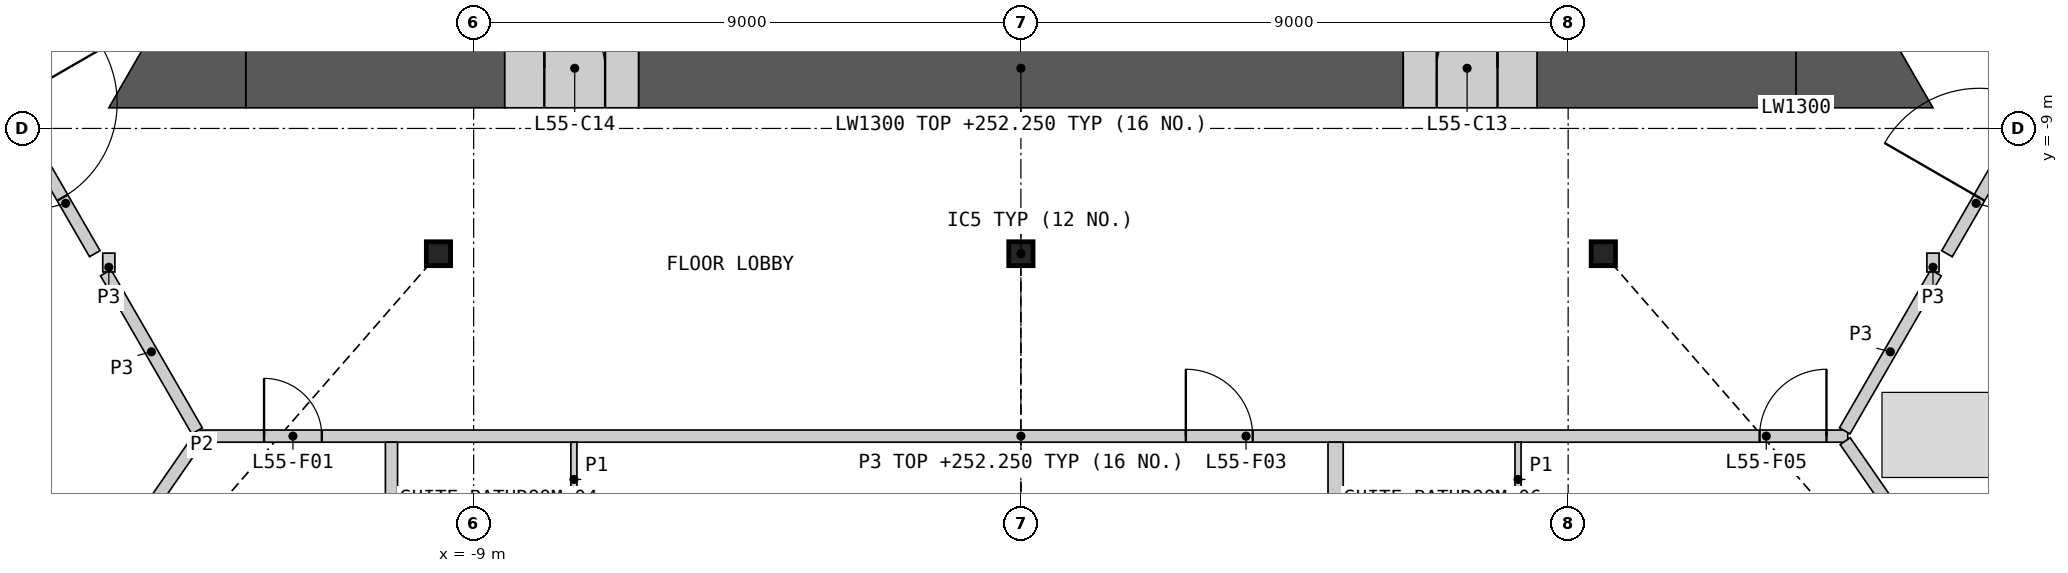
"""IFC4 building model, lengths in metres.
Left out: names, types, materials, properties, quantities, classifications, styles, units other than length and angle.
Written with IfcOpenShell. Run it as: python <this file> out.ifc"""

import sys

from ifc_helpers import new_model, si_unit, direction, frame, frame_2d, origin, origin_2d, place, context, subcontext, project, spatial, polyline, rectangle, i_section, outline, extrude, element, fill, save


model = new_model("IFC4")
c1 = context("Model", 3, precision=1e-05, world=origin(), true_north=direction((0.0, 1.0)))
c2 = subcontext(c1, "Body", "Model", "MODEL_VIEW")
j1 = project(units=[si_unit("LENGTHUNIT", "METRE"), si_unit("PLANEANGLEUNIT", "RADIAN")], contexts=[c1])
p1 = place(None, origin())
s1 = spatial("IfcSite", under=j1, at=p1, CompositionType="ELEMENT")
p2 = place(p1, origin())
s2 = spatial("IfcBuilding", under=s1, at=p2, CompositionType="ELEMENT")
p3 = place(p2, frame((0.0, 0.0, 249.0)))
s3 = spatial("IfcBuildingStorey", under=s2, at=p3, CompositionType="ELEMENT", Elevation=249.0)
for number, where, z_axis, x_axis in (
    (1, (-9.578, -11.06, 0.0), (0.0, 0.0, 1.0), (1.0, 0.0, 0.0)),
    (2, (0.0, -11.06, 0.0), (0.0, 0.0, 1.0), (1.0, 0.0, 0.0)),
    (3, (9.578, -11.06, 0.0), (0.0, 0.0, 1.0), (1.0, 0.0, 0.0)),
):
    element("IfcColumn", number, at=place(p3, frame(where, z_axis=z_axis, x_axis=x_axis)), inside=s3, PredefinedType="COLUMN", context=c2, shape_type="SweptSolid", body=[
        extrude(i_section(OverallWidth=0.399, OverallDepth=0.393, WebThickness=0.023, FlangeThickness=0.037, at=origin_2d()), origin(), (0.0, 0.0, 1.0), 3.6),
    ])
p4 = place(p3, frame((-6.288, -8.01, 0.0), z_axis=(0.0, 0.0, 1.0), x_axis=(1.0, 0.0, 0.0)))
e4 = element("IfcWall", 4, at=p4, inside=s3, PredefinedType="SHEAR", context=c2, shape_type="SweptSolid", body=[
    extrude(rectangle(XDim=12.576, YDim=1.3, at=frame_2d((6.288, 0.0))), origin(), (0.0, 0.0, 1.0), 3.25),
])
for number, where, z_axis, x_axis in (
    (5, (8.488, -8.01, 0.0), (0.0, 0.0, 1.0), (1.0, 0.0, 0.0)),
    (6, (-12.748, -8.01, 0.0), (0.0, 0.0, 1.0), (1.0, 0.0, 0.0)),
):
    element("IfcWall", number, at=place(p3, frame(where, z_axis=z_axis, x_axis=x_axis)), inside=s3, PredefinedType="SHEAR", context=c2, shape_type="SweptSolid", body=[
        extrude(rectangle(XDim=4.26, YDim=1.3, at=frame_2d((2.13, 0.0))), origin(), (0.0, 0.0, 1.0), 3.25),
    ])
p5 = place(p3, origin())
e7 = element("IfcWall", 7, at=p5, inside=s3, PredefinedType="SHEAR", context=c2, shape_type="SweptSolid", body=[
    extrude(outline(polyline([(12.748, -8.66), (12.748, -7.36), (13.874, -6.71), (15.0, -8.66), (12.748, -8.66)])), origin(), (0.0, 0.0, 1.0), 3.25),
])
p6 = place(p3, origin())
e8 = element("IfcWall", 8, at=p6, inside=s3, PredefinedType="SHEAR", context=c2, shape_type="SweptSolid", body=[
    extrude(outline(polyline([(-13.874, -6.71), (-12.748, -7.36), (-12.748, -8.66), (-15.0, -8.66), (-13.874, -6.71)])), origin(), (0.0, 0.0, 1.0), 3.25),
])
p7 = place(p3, frame((6.288, -8.01, 0.0), z_axis=(0.0, 0.0, 1.0), x_axis=(1.0, 0.0, 0.0)))
e9 = element("IfcWall", 9, at=p7, inside=s3, PredefinedType="SHEAR", context=c2, shape_type="SweptSolid", body=[
    extrude(rectangle(XDim=2.2, YDim=1.3, at=frame_2d((1.1, 0.0))), origin(), (0.0, 0.0, 1.0), 3.25),
])
p8 = place(p7, frame((0.55, 0.0, 0.0)))
e10 = element("IfcOpeningElement", 10, at=p8, cuts=e9, PredefinedType="OPENING", context=c2, shape_type="SweptSolid", body=[
    extrude(rectangle(XDim=1.0, YDim=2.1, at=frame_2d((0.5, 1.05))), frame((0.0, 0.66, 0.0), z_axis=(0.0, -1.0, 0.0), x_axis=(1.0, 0.0, 0.0)), (0.0, 0.0, 1.0), 1.32),
])
p9 = place(p3, frame((-8.488, -8.01, 0.0), z_axis=(0.0, 0.0, 1.0), x_axis=(1.0, 0.0, 0.0)))
e11 = element("IfcWall", 11, at=p9, inside=s3, PredefinedType="SHEAR", context=c2, shape_type="SweptSolid", body=[
    extrude(rectangle(XDim=2.2, YDim=1.3, at=frame_2d((1.1, 0.0))), origin(), (0.0, 0.0, 1.0), 3.25),
])
p10 = place(p9, frame((0.65, 0.0, 0.0)))
e12 = element("IfcOpeningElement", 12, at=p10, cuts=e11, PredefinedType="OPENING", context=c2, shape_type="SweptSolid", body=[
    extrude(rectangle(XDim=1.0, YDim=2.1, at=frame_2d((0.5, 1.05))), frame((0.0, 0.66, 0.0), z_axis=(0.0, -1.0, 0.0), x_axis=(1.0, 0.0, 0.0)), (0.0, 0.0, 1.0), 1.32),
])
p11 = place(p3, frame((-13.599, -14.06, 0.0), z_axis=(0.0, 0.0, 1.0), x_axis=(1.0, 0.0, 0.0)))
e13 = element("IfcWall", 13, at=p11, inside=s3, PredefinedType="PARTITIONING", context=c2, shape_type="SweptSolid", body=[
    extrude(rectangle(XDim=27.198, YDim=0.2, at=frame_2d((13.599, 0.0))), origin(), (0.0, 0.0, 1.0), 3.25),
])
p12 = place(p11, frame((1.152, 0.0, 0.0)))
e14 = element("IfcOpeningElement", 14, at=p12, cuts=e13, PredefinedType="OPENING", context=c2, shape_type="SweptSolid", body=[
    extrude(rectangle(XDim=0.95, YDim=2.1, at=frame_2d((0.475, 1.05))), frame((0.0, 0.11, 0.0), z_axis=(0.0, -1.0, 0.0), x_axis=(1.0, 0.0, 0.0)), (0.0, 0.0, 1.0), 0.22),
])
p13 = place(p11, frame((16.311, 0.0, 0.0)))
e15 = element("IfcOpeningElement", 15, at=p13, cuts=e13, PredefinedType="OPENING", context=c2, shape_type="SweptSolid", body=[
    extrude(rectangle(XDim=1.1, YDim=2.1, at=frame_2d((0.55, 1.05))), frame((0.0, 0.11, 0.0), z_axis=(0.0, -1.0, 0.0), x_axis=(1.0, 0.0, 0.0)), (0.0, 0.0, 1.0), 0.22),
])
p14 = place(p11, frame((25.747, 0.0, 0.0)))
e16 = element("IfcOpeningElement", 16, at=p14, cuts=e13, PredefinedType="OPENING", context=c2, shape_type="SweptSolid", body=[
    extrude(rectangle(XDim=1.1, YDim=2.1, at=frame_2d((0.55, 1.05))), frame((0.0, 0.11, 0.0), z_axis=(0.0, -1.0, 0.0), x_axis=(1.0, 0.0, 0.0)), (0.0, 0.0, 1.0), 0.22),
])
p15 = place(p3, frame((-17.244, -7.747, 0.0), z_axis=(0.0, 0.0, 1.0), x_axis=(0.500017753321, 0.866015153657, 0.0)))
e17 = element("IfcWall", 17, at=p15, inside=s3, PredefinedType="PARTITIONING", context=c2, shape_type="SweptSolid", body=[
    extrude(rectangle(XDim=5.51, YDim=0.2, at=frame_2d((2.755, 0.0))), origin(), (0.0, 0.0, 1.0), 3.25),
])
p16 = place(p15, frame((0.401, 0.0, 0.0)))
e18 = element("IfcOpeningElement", 18, at=p16, cuts=e17, PredefinedType="OPENING", context=c2, shape_type="SweptSolid", body=[
    extrude(rectangle(XDim=1.1, YDim=2.1, at=frame_2d((0.55, 1.05))), frame((0.0, 0.11, 0.0), z_axis=(0.0, -1.0, 0.0), x_axis=(1.0, 0.0, 0.0)), (0.0, 0.0, 1.0), 0.22),
])
p17 = place(p3, frame((14.489, -2.975, 0.0), z_axis=(0.0, 0.0, 1.0), x_axis=(0.500017753321, -0.866015153657, 0.0)))
e19 = element("IfcWall", 19, at=p17, inside=s3, PredefinedType="PARTITIONING", context=c2, shape_type="SweptSolid", body=[
    extrude(rectangle(XDim=5.51, YDim=0.2, at=frame_2d((2.755, 0.0))), origin(), (0.0, 0.0, 1.0), 3.25),
])
p18 = place(p17, frame((4.06, 0.0, 0.0)))
e20 = element("IfcOpeningElement", 20, at=p18, cuts=e19, PredefinedType="OPENING", context=c2, shape_type="SweptSolid", body=[
    extrude(rectangle(XDim=1.1, YDim=2.1, at=frame_2d((0.55, 1.05))), frame((0.0, 0.11, 0.0), z_axis=(0.0, -1.0, 0.0), x_axis=(1.0, 0.0, 0.0)), (0.0, 0.0, 1.0), 0.22),
])
p19 = place(p3, frame((5.176, -18.855, 0.0), z_axis=(0.0, 0.0, 1.0), x_axis=(0.0, 1.0, 0.0)))
e21 = element("IfcWall", 21, at=p19, inside=s3, PredefinedType="PARTITIONING", context=c2, shape_type="SweptSolid", body=[
    extrude(rectangle(XDim=4.695, YDim=0.25, at=frame_2d((2.348, 0.0))), origin(), (0.0, 0.0, 1.0), 2.404),
])
p20 = place(p3, frame((15.231, -11.06, 0.0), z_axis=(0.0, 0.0, 1.0), x_axis=(0.499961815444, 0.866047448526, 0.0)))
e22 = element("IfcWall", 22, at=p20, inside=s3, PredefinedType="PARTITIONING", context=c2, shape_type="SweptSolid", body=[
    extrude(rectangle(XDim=3.826, YDim=0.2, at=frame_2d((1.913, 0.0))), origin(), (0.0, 0.0, 1.0), 3.25),
])
p21 = place(p20, frame((1.064, 0.0, 0.0)))
e23 = element("IfcOpeningElement", 23, at=p21, cuts=e22, PredefinedType="OPENING", context=c2, shape_type="SweptSolid", body=[
    extrude(rectangle(XDim=1.8, YDim=2.1, at=frame_2d((0.9, 1.05))), frame((0.0, 0.11, 0.0), z_axis=(0.0, -1.0, 0.0), x_axis=(1.0, 0.0, 0.0)), (0.0, 0.0, 1.0), 0.22),
])
p22 = place(p3, frame((-17.144, -7.747, 0.0), z_axis=(0.0, 0.0, 1.0), x_axis=(0.499961815444, -0.866047448526, 0.0)))
e24 = element("IfcWall", 24, at=p22, inside=s3, PredefinedType="PARTITIONING", context=c2, shape_type="SweptSolid", body=[
    extrude(rectangle(XDim=3.826, YDim=0.2, at=frame_2d((1.913, 0.0))), origin(), (0.0, 0.0, 1.0), 3.25),
])
p23 = place(p22, frame((0.962, 0.0, 0.0)))
e25 = element("IfcOpeningElement", 25, at=p23, cuts=e24, PredefinedType="OPENING", context=c2, shape_type="SweptSolid", body=[
    extrude(rectangle(XDim=1.8, YDim=2.1, at=frame_2d((0.9, 1.05))), frame((0.0, 0.11, 0.0), z_axis=(0.0, -1.0, 0.0), x_axis=(1.0, 0.0, 0.0)), (0.0, 0.0, 1.0), 0.22),
])
for number, where, z_axis, x_axis in (
    (26, (13.549, -13.974, 0.0), (0.0, 0.0, 1.0), (0.5, 0.866, 0.0)),
    (27, (-15.05, -11.374, 0.0), (0.0, 0.0, 1.0), (0.5, -0.866, 0.0)),
):
    element("IfcWall", number, at=place(p3, frame(where, z_axis=z_axis, x_axis=x_axis)), inside=s3, PredefinedType="PARTITIONING", context=c2, shape_type="SweptSolid", body=[
        extrude(rectangle(XDim=3.002, YDim=0.2, at=frame_2d((1.501, 0.0))), origin(), (0.0, 0.0, 1.0), 3.25),
    ])
for number, where, z_axis, x_axis in (
    (28, (15.0, -11.36, 0.0), (0.0, 0.0, 1.0), (0.0, 1.0, 0.0)),
    (29, (-15.0, -11.36, 0.0), (0.0, 0.0, 1.0), (0.0, 1.0, 0.0)),
):
    element("IfcWall", number, at=place(p3, frame(where, z_axis=z_axis, x_axis=x_axis)), inside=s3, PredefinedType="PARTITIONING", context=c2, shape_type="SweptSolid", body=[
        extrude(rectangle(XDim=0.31, YDim=0.2, at=frame_2d((0.155, 0.0))), origin(), (0.0, 0.0, 1.0), 3.25),
    ])
p24 = place(p3, origin())
e30 = element("IfcWall", 30, at=p24, inside=s3, PredefinedType="PARTITIONING", context=c2, shape_type="SweptSolid", body=[
    extrude(outline(polyline([(-13.473, -14.199), (-19.794, -23.331), (-20.439, -23.912), (-13.638, -14.086), (-13.473, -14.199)])), origin(), (0.0, 0.0, 1.0), 2.404),
])
p25 = place(p3, frame((13.556, -14.143, 0.0), z_axis=(0.0, 0.0, 1.0), x_axis=(0.56913494803, -0.82224413098, 0.0)))
e31 = element("IfcWall", 31, at=p25, inside=s3, PredefinedType="PARTITIONING", context=c2, shape_type="SweptSolid", body=[
    extrude(rectangle(XDim=12.014, YDim=0.2, at=frame_2d((6.007, 0.0))), origin(), (0.0, 0.0, 1.0), 2.404),
])
p26 = place(p3, frame((-10.351, -23.527, 0.0), z_axis=(0.0, 0.0, 1.0), x_axis=(0.0, 1.0, 0.0)))
e32 = element("IfcWall", 32, at=p26, inside=s3, PredefinedType="PARTITIONING", context=c2, shape_type="SweptSolid", body=[
    extrude(rectangle(XDim=9.366, YDim=0.2, at=frame_2d((4.683, 0.0))), origin(), (0.0, 0.0, 1.0), 2.404),
])
p27 = place(p3, frame((-7.351, -16.61, 0.0), z_axis=(0.0, 0.0, 1.0), x_axis=(0.0, 1.0, 0.0)))
e33 = element("IfcWall", 33, at=p27, inside=s3, PredefinedType="PARTITIONING", context=c2, shape_type="SweptSolid", body=[
    extrude(rectangle(XDim=2.45, YDim=0.1, at=frame_2d((1.225, 0.0))), origin(), (0.0, 0.0, 1.0), 2.404),
])
p28 = place(p27, frame((0.25, 0.0, 0.0)))
e34 = element("IfcOpeningElement", 34, at=p28, cuts=e33, PredefinedType="OPENING", context=c2, shape_type="SweptSolid", body=[
    extrude(rectangle(XDim=0.95, YDim=2.1, at=frame_2d((0.475, 1.05))), frame((0.0, 0.06, 0.0), z_axis=(0.0, -1.0, 0.0), x_axis=(1.0, 0.0, 0.0)), (0.0, 0.0, 1.0), 0.12),
])
p29 = place(p3, frame((8.176, -16.61, 0.0), z_axis=(0.0, 0.0, 1.0), x_axis=(0.0, 1.0, 0.0)))
e35 = element("IfcWall", 35, at=p29, inside=s3, PredefinedType="PARTITIONING", context=c2, shape_type="SweptSolid", body=[
    extrude(rectangle(XDim=2.45, YDim=0.1, at=frame_2d((1.225, 0.0))), origin(), (0.0, 0.0, 1.0), 2.404),
])
p30 = place(p29, frame((0.25, 0.0, 0.0)))
e36 = element("IfcOpeningElement", 36, at=p30, cuts=e35, PredefinedType="OPENING", context=c2, shape_type="SweptSolid", body=[
    extrude(rectangle(XDim=0.95, YDim=2.1, at=frame_2d((0.475, 1.05))), frame((0.0, 0.06, 0.0), z_axis=(0.0, -1.0, 0.0), x_axis=(1.0, 0.0, 0.0)), (0.0, 0.0, 1.0), 0.12),
])
p31 = place(p12, origin())
e37 = element("IfcDoor", 37, at=p31, inside=s3, OperationType="SINGLE_SWING_LEFT", PredefinedType="DOOR", context=c2, shape_type="SweptSolid", body=[
    extrude(rectangle(XDim=0.95, YDim=2.1, at=frame_2d((0.475, 1.05))), frame((0.0, 0.025, 0.0), z_axis=(0.0, -1.0, 0.0), x_axis=(1.0, 0.0, 0.0)), (0.0, 0.0, 1.0), 0.05),
])
fill(e14, e37)
p32 = place(p13, origin())
e38 = element("IfcDoor", 38, at=p32, inside=s3, OperationType="SINGLE_SWING_LEFT", PredefinedType="DOOR", context=c2, shape_type="SweptSolid", body=[
    extrude(rectangle(XDim=1.1, YDim=2.1, at=frame_2d((0.55, 1.05))), frame((0.0, 0.025, 0.0), z_axis=(0.0, -1.0, 0.0), x_axis=(1.0, 0.0, 0.0)), (0.0, 0.0, 1.0), 0.05),
])
fill(e15, e38)
p33 = place(p14, origin())
e39 = element("IfcDoor", 39, at=p33, inside=s3, OperationType="SINGLE_SWING_RIGHT", PredefinedType="DOOR", context=c2, shape_type="SweptSolid", body=[
    extrude(rectangle(XDim=1.1, YDim=2.1, at=frame_2d((0.55, 1.05))), frame((0.0, 0.025, 0.0), z_axis=(0.0, -1.0, 0.0), x_axis=(1.0, 0.0, 0.0)), (0.0, 0.0, 1.0), 0.05),
])
fill(e16, e39)
p34 = place(p21, origin())
e40 = element("IfcDoor", 40, at=p34, inside=s3, OperationType="DOUBLE_DOOR_SINGLE_SWING", PredefinedType="DOOR", context=c2, shape_type="SweptSolid", body=[
    extrude(rectangle(XDim=1.8, YDim=2.1, at=frame_2d((0.9, 1.05))), frame((0.0, 0.025, 0.0), z_axis=(0.0, -1.0, 0.0), x_axis=(1.0, 0.0, 0.0)), (0.0, 0.0, 1.0), 0.05),
])
fill(e23, e40)
p35 = place(p23, origin())
e41 = element("IfcDoor", 41, at=p35, inside=s3, OperationType="DOUBLE_DOOR_SINGLE_SWING", PredefinedType="DOOR", context=c2, shape_type="SweptSolid", body=[
    extrude(rectangle(XDim=1.8, YDim=2.1, at=frame_2d((0.9, 1.05))), frame((0.0, 0.025, 0.0), z_axis=(0.0, -1.0, 0.0), x_axis=(1.0, 0.0, 0.0)), (0.0, 0.0, 1.0), 0.05),
])
fill(e25, e41)
save(model, sys.argv[1])
